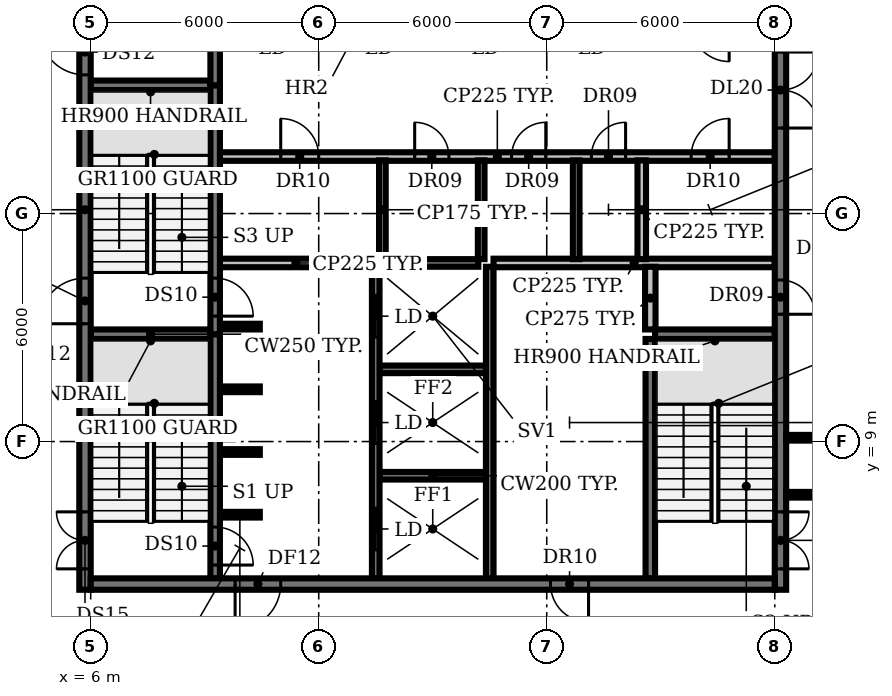
"""IFC4 building model, lengths in metres.
Left out: names, types, materials, properties, quantities, classifications, styles, units other than length and angle.
Written with IfcOpenShell. Run it as: python <this file> out.ifc"""

import sys

from ifc_helpers import new_model, si_unit, direction, frame, frame_2d, origin, place, context, subcontext, project, spatial, rectangle, extrude, element, fill, save


model = new_model("IFC4")
c1 = context("Model", 3, precision=1e-05, world=origin(), true_north=direction((0.0, 1.0)))
c2 = subcontext(c1, "Body", "Model", "MODEL_VIEW")
j1 = project(units=[si_unit("LENGTHUNIT", "METRE"), si_unit("PLANEANGLEUNIT", "RADIAN")], contexts=[c1])
p1 = place(None, origin())
s1 = spatial("IfcSite", under=j1, at=p1, CompositionType="ELEMENT")
p2 = place(p1, origin())
s2 = spatial("IfcBuilding", under=s1, at=p2, CompositionType="ELEMENT")
p3 = place(p2, frame((0.0, 0.0, 314.6)))
s3 = spatial("IfcBuildingStorey", under=s2, at=p3, CompositionType="ELEMENT", Elevation=314.6)
p4 = place(p3, frame((9.4, 7.075, 0.0), z_axis=(0.0, 0.0, 1.0), x_axis=(1.0, 0.0, 0.0)))
e1 = element("IfcWall", 1, at=p4, inside=s3, PredefinedType="SHEAR", context=c2, shape_type="SweptSolid", body=[
    extrude(rectangle(XDim=1.05, YDim=0.15, at=frame_2d((0.525, 0.0))), origin(), (0.0, 0.0, 1.0), 3.9),
])
p5 = place(p3, frame((13.6, 8.1, 0.0), z_axis=(0.0, 0.0, 1.0), x_axis=(1.0, 0.0, 0.0)))
e2 = element("IfcWall", 2, at=p5, inside=s3, PredefinedType="SHEAR", context=c2, shape_type="SweptSolid", body=[
    extrude(rectangle(XDim=2.8, YDim=0.2, at=frame_2d((1.4, 0.0))), origin(), (0.0, 0.0, 1.0), 3.9),
])
for number, where, z_axis, x_axis in (
    (3, (9.4, 8.725, 0.0), (0.0, 0.0, 1.0), (1.0, 0.0, 0.0)),
    (4, (9.4, 10.375, 0.0), (0.0, 0.0, 1.0), (1.0, 0.0, 0.0)),
):
    element("IfcWall", number, at=place(p3, frame(where, z_axis=z_axis, x_axis=x_axis)), inside=s3, PredefinedType="SHEAR", context=c2, shape_type="SweptSolid", body=[
        extrude(rectangle(XDim=1.05, YDim=0.15, at=frame_2d((0.525, 0.0))), origin(), (0.0, 0.0, 1.0), 3.9),
    ])
p6 = place(p3, frame((13.6, 10.9, 0.0), z_axis=(0.0, 0.0, 1.0), x_axis=(1.0, 0.0, 0.0)))
e5 = element("IfcWall", 5, at=p6, inside=s3, PredefinedType="SHEAR", context=c2, shape_type="SweptSolid", body=[
    extrude(rectangle(XDim=2.8, YDim=0.2, at=frame_2d((1.4, 0.0))), origin(), (0.0, 0.0, 1.0), 3.9),
])
for number, where, z_axis, x_axis in (
    (6, (6.0, 11.825, 0.0), (0.0, 0.0, 1.0), (1.0, 0.0, 0.0)),
    (7, (20.85, 11.825, 0.0), (0.0, 0.0, 1.0), (1.0, 0.0, 0.0)),
):
    element("IfcWall", number, at=place(p3, frame(where, z_axis=z_axis, x_axis=x_axis)), inside=s3, PredefinedType="SHEAR", context=c2, shape_type="SweptSolid", body=[
        extrude(rectangle(XDim=3.15, YDim=0.25, at=frame_2d((1.575, 0.0))), origin(), (0.0, 0.0, 1.0), 3.9),
    ])
p7 = place(p3, frame((9.4, 12.025, 0.0), z_axis=(0.0, 0.0, 1.0), x_axis=(1.0, 0.0, 0.0)))
e8 = element("IfcWall", 8, at=p7, inside=s3, PredefinedType="SHEAR", context=c2, shape_type="SweptSolid", body=[
    extrude(rectangle(XDim=1.05, YDim=0.15, at=frame_2d((0.525, 0.0))), origin(), (0.0, 0.0, 1.0), 3.9),
])
p8 = place(p3, frame((9.4, 13.7, 0.0), z_axis=(0.0, 0.0, 1.0), x_axis=(1.0, 0.0, 0.0)))
e9 = element("IfcWall", 9, at=p8, inside=s3, PredefinedType="PARTITIONING", context=c2, shape_type="SweptSolid", body=[
    extrude(rectangle(XDim=4.0, YDim=0.225, at=frame_2d((2.0, 0.0))), origin(), (0.0, 0.0, 1.0), 3.9),
])
p9 = place(p3, frame((13.75, 13.7, 0.0), z_axis=(0.0, 0.0, 1.0), x_axis=(1.0, 0.0, 0.0)))
e10 = element("IfcWall", 10, at=p9, inside=s3, PredefinedType="SHEAR", context=c2, shape_type="SweptSolid", body=[
    extrude(rectangle(XDim=2.45, YDim=0.2, at=frame_2d((1.225, 0.0))), origin(), (0.0, 0.0, 1.0), 3.9),
])
p10 = place(p3, frame((16.6, 13.7, 0.0), z_axis=(0.0, 0.0, 1.0), x_axis=(1.0, 0.0, 0.0)))
e11 = element("IfcWall", 11, at=p10, inside=s3, PredefinedType="PARTITIONING", context=c2, shape_type="SweptSolid", body=[
    extrude(rectangle(XDim=7.4, YDim=0.225, at=frame_2d((3.7, 0.0))), origin(), (0.0, 0.0, 1.0), 3.9),
])
p11 = place(p3, frame((9.4, 16.5, 0.0), z_axis=(0.0, 0.0, 1.0), x_axis=(1.0, 0.0, 0.0)))
e12 = element("IfcWall", 12, at=p11, inside=s3, PredefinedType="PARTITIONING", context=c2, shape_type="SweptSolid", body=[
    extrude(rectangle(XDim=14.6, YDim=0.225, at=frame_2d((7.3, 0.0))), origin(), (0.0, 0.0, 1.0), 3.9),
])
p12 = place(p11, frame((1.6, 0.0, 0.0)))
e13 = element("IfcOpeningElement", 13, at=p12, cuts=e12, PredefinedType="OPENING", context=c2, shape_type="SweptSolid", body=[
    extrude(rectangle(XDim=1.0, YDim=2.1, at=frame_2d((0.5, 1.05))), frame((0.0, 0.123, 0.0), z_axis=(0.0, -1.0, 0.0), x_axis=(1.0, 0.0, 0.0)), (0.0, 0.0, 1.0), 0.245),
])
p13 = place(p11, frame((5.125, 0.0, 0.0)))
e14 = element("IfcOpeningElement", 14, at=p13, cuts=e12, PredefinedType="OPENING", context=c2, shape_type="SweptSolid", body=[
    extrude(rectangle(XDim=0.9, YDim=2.1, at=frame_2d((0.45, 1.05))), frame((0.0, 0.123, 0.0), z_axis=(0.0, -1.0, 0.0), x_axis=(1.0, 0.0, 0.0)), (0.0, 0.0, 1.0), 0.245),
])
p14 = place(p11, frame((7.675, 0.0, 0.0)))
e15 = element("IfcOpeningElement", 15, at=p14, cuts=e12, PredefinedType="OPENING", context=c2, shape_type="SweptSolid", body=[
    extrude(rectangle(XDim=0.9, YDim=2.1, at=frame_2d((0.45, 1.05))), frame((0.0, 0.123, 0.0), z_axis=(0.0, -1.0, 0.0), x_axis=(1.0, 0.0, 0.0)), (0.0, 0.0, 1.0), 0.245),
])
p15 = place(p11, frame((9.775, 0.0, 0.0)))
e16 = element("IfcOpeningElement", 16, at=p15, cuts=e12, PredefinedType="OPENING", context=c2, shape_type="SweptSolid", body=[
    extrude(rectangle(XDim=0.9, YDim=2.1, at=frame_2d((0.45, 1.05))), frame((0.0, 0.123, 0.0), z_axis=(0.0, -1.0, 0.0), x_axis=(1.0, 0.0, 0.0)), (0.0, 0.0, 1.0), 0.245),
])
p16 = place(p11, frame((12.4, 0.0, 0.0)))
e17 = element("IfcOpeningElement", 17, at=p16, cuts=e12, PredefinedType="OPENING", context=c2, shape_type="SweptSolid", body=[
    extrude(rectangle(XDim=1.0, YDim=2.1, at=frame_2d((0.5, 1.05))), frame((0.0, 0.123, 0.0), z_axis=(0.0, -1.0, 0.0), x_axis=(1.0, 0.0, 0.0)), (0.0, 0.0, 1.0), 0.245),
])
p17 = place(p3, frame((6.0, 18.375, 0.0), z_axis=(0.0, 0.0, 1.0), x_axis=(1.0, 0.0, 0.0)))
e18 = element("IfcWall", 18, at=p17, inside=s3, PredefinedType="SHEAR", context=c2, shape_type="SweptSolid", body=[
    extrude(rectangle(XDim=3.15, YDim=0.25, at=frame_2d((1.575, 0.0))), origin(), (0.0, 0.0, 1.0), 3.9),
])
p18 = place(p3, frame((9.275, 11.825, 0.0), z_axis=(0.0, 0.0, 1.0), x_axis=(0.0, -1.0, 0.0)))
e19 = element("IfcWall", 19, at=p18, inside=s3, PredefinedType="SHEAR", context=c2, shape_type="SweptSolid", body=[
    extrude(rectangle(XDim=6.425, YDim=0.25, at=frame_2d((3.212, 0.0))), origin(), (0.0, 0.0, 1.0), 3.9),
])
p19 = place(p18, frame((5.075, 0.0, 0.0)))
e20 = element("IfcOpeningElement", 20, at=p19, cuts=e19, PredefinedType="OPENING", context=c2, shape_type="SweptSolid", body=[
    extrude(rectangle(XDim=1.0, YDim=2.1, at=frame_2d((0.5, 1.05))), frame((0.0, 0.135, 0.0), z_axis=(0.0, -1.0, 0.0), x_axis=(1.0, 0.0, 0.0)), (0.0, 0.0, 1.0), 0.27),
])
p20 = place(p3, frame((9.275, 18.375, 0.0), z_axis=(0.0, 0.0, 1.0), x_axis=(0.0, -1.0, 0.0)))
e21 = element("IfcWall", 21, at=p20, inside=s3, PredefinedType="SHEAR", context=c2, shape_type="SweptSolid", body=[
    extrude(rectangle(XDim=6.55, YDim=0.25, at=frame_2d((3.275, 0.0))), origin(), (0.0, 0.0, 1.0), 3.9),
])
p21 = place(p20, frame((5.075, 0.0, 0.0)))
e22 = element("IfcOpeningElement", 22, at=p21, cuts=e21, PredefinedType="OPENING", context=c2, shape_type="SweptSolid", body=[
    extrude(rectangle(XDim=1.0, YDim=2.1, at=frame_2d((0.5, 1.05))), frame((0.0, 0.135, 0.0), z_axis=(0.0, -1.0, 0.0), x_axis=(1.0, 0.0, 0.0)), (0.0, 0.0, 1.0), 0.27),
])
p22 = place(p3, frame((9.275, 18.375, 0.0), z_axis=(0.0, 0.0, 1.0), x_axis=(0.0, 1.0, 0.0)))
e23 = element("IfcWall", 23, at=p22, inside=s3, PredefinedType="SHEAR", context=c2, shape_type="SweptSolid", body=[
    extrude(rectangle(XDim=6.425, YDim=0.25, at=frame_2d((3.212, 0.0))), origin(), (0.0, 0.0, 1.0), 3.9),
])
p23 = place(p3, frame((13.5, 5.4, 0.0), z_axis=(0.0, 0.0, 1.0), x_axis=(0.0, 1.0, 0.0)))
e24 = element("IfcWall", 24, at=p23, inside=s3, PredefinedType="SHEAR", context=c2, shape_type="SweptSolid", body=[
    extrude(rectangle(XDim=8.2, YDim=0.2, at=frame_2d((4.1, 0.0))), origin(), (0.0, 0.0, 1.0), 3.9),
])
p24 = place(p23, frame((0.75, 0.0, 0.0)))
e25 = element("IfcOpeningElement", 25, at=p24, cuts=e24, PredefinedType="OPENING", context=c2, shape_type="SweptSolid", body=[
    extrude(rectangle(XDim=1.1, YDim=2.1, at=frame_2d((0.55, 1.05))), frame((0.0, 0.11, 0.0), z_axis=(0.0, -1.0, 0.0), x_axis=(1.0, 0.0, 0.0)), (0.0, 0.0, 1.0), 0.22),
])
p25 = place(p23, frame((3.55, 0.0, 0.0)))
e26 = element("IfcOpeningElement", 26, at=p25, cuts=e24, PredefinedType="OPENING", context=c2, shape_type="SweptSolid", body=[
    extrude(rectangle(XDim=1.1, YDim=2.1, at=frame_2d((0.55, 1.05))), frame((0.0, 0.11, 0.0), z_axis=(0.0, -1.0, 0.0), x_axis=(1.0, 0.0, 0.0)), (0.0, 0.0, 1.0), 0.22),
])
p26 = place(p23, frame((6.35, 0.0, 0.0)))
e27 = element("IfcOpeningElement", 27, at=p26, cuts=e24, PredefinedType="OPENING", context=c2, shape_type="SweptSolid", body=[
    extrude(rectangle(XDim=1.1, YDim=2.1, at=frame_2d((0.55, 1.05))), frame((0.0, 0.11, 0.0), z_axis=(0.0, -1.0, 0.0), x_axis=(1.0, 0.0, 0.0)), (0.0, 0.0, 1.0), 0.22),
])
for number, where, z_axis, x_axis in (
    (28, (13.675, 13.8, 0.0), (0.0, 0.0, 1.0), (0.0, 1.0, 0.0)),
    (29, (16.275, 13.8, 0.0), (0.0, 0.0, 1.0), (0.0, 1.0, 0.0)),
):
    element("IfcWall", number, at=place(p3, frame(where, z_axis=z_axis, x_axis=x_axis)), inside=s3, PredefinedType="PARTITIONING", context=c2, shape_type="SweptSolid", body=[
        extrude(rectangle(XDim=2.6, YDim=0.175, at=frame_2d((1.3, 0.0))), origin(), (0.0, 0.0, 1.0), 3.9),
    ])
p27 = place(p3, frame((16.5, 5.4, 0.0), z_axis=(0.0, 0.0, 1.0), x_axis=(0.0, 1.0, 0.0)))
e30 = element("IfcWall", 30, at=p27, inside=s3, PredefinedType="SHEAR", context=c2, shape_type="SweptSolid", body=[
    extrude(rectangle(XDim=8.2, YDim=0.2, at=frame_2d((4.1, 0.0))), origin(), (0.0, 0.0, 1.0), 3.9),
])
p28 = place(p3, frame((18.775, 13.8, 0.0), z_axis=(0.0, 0.0, 1.0), x_axis=(0.0, 1.0, 0.0)))
e31 = element("IfcWall", 31, at=p28, inside=s3, PredefinedType="PARTITIONING", context=c2, shape_type="SweptSolid", body=[
    extrude(rectangle(XDim=2.6, YDim=0.175, at=frame_2d((1.3, 0.0))), origin(), (0.0, 0.0, 1.0), 3.9),
])
p29 = place(p3, frame((20.5, 13.8, 0.0), z_axis=(0.0, 0.0, 1.0), x_axis=(0.0, 1.0, 0.0)))
e32 = element("IfcWall", 32, at=p29, inside=s3, PredefinedType="PARTITIONING", context=c2, shape_type="SweptSolid", body=[
    extrude(rectangle(XDim=2.6, YDim=0.225, at=frame_2d((1.3, 0.0))), origin(), (0.0, 0.0, 1.0), 3.9),
])
p30 = place(p3, frame((20.725, 5.4, 0.0), z_axis=(0.0, 0.0, 1.0), x_axis=(0.0, 1.0, 0.0)))
e33 = element("IfcWall", 33, at=p30, inside=s3, PredefinedType="SHEAR", context=c2, shape_type="SweptSolid", body=[
    extrude(rectangle(XDim=6.3, YDim=0.25, at=frame_2d((3.15, 0.0))), origin(), (0.0, 0.0, 1.0), 3.9),
])
p31 = place(p3, frame((20.725, 11.95, 0.0), z_axis=(0.0, 0.0, 1.0), x_axis=(0.0, 1.0, 0.0)))
e34 = element("IfcWall", 34, at=p31, inside=s3, PredefinedType="PARTITIONING", context=c2, shape_type="SweptSolid", body=[
    extrude(rectangle(XDim=1.65, YDim=0.275, at=frame_2d((0.825, 0.0))), origin(), (0.0, 0.0, 1.0), 3.9),
])
p32 = place(p3, frame((5.85, 5.1, 0.0), z_axis=(0.0, 0.0, 1.0), x_axis=(0.0, 1.0, 0.0)))
e35 = element("IfcWall", 35, at=p32, inside=s3, PredefinedType="SHEAR", context=c2, shape_type="SweptSolid", body=[
    extrude(rectangle(XDim=20.0, YDim=0.3, at=frame_2d((10.0, 0.0))), origin(), (0.0, 0.0, 1.0), 3.9),
])
p33 = place(p32, frame((0.55, 0.0, 0.0)))
e36 = element("IfcOpeningElement", 36, at=p33, cuts=e35, PredefinedType="OPENING", context=c2, shape_type="SweptSolid", body=[
    extrude(rectangle(XDim=1.5, YDim=2.1, at=frame_2d((0.75, 1.05))), frame((0.0, 0.16, 0.0), z_axis=(0.0, -1.0, 0.0), x_axis=(1.0, 0.0, 0.0)), (0.0, 0.0, 1.0), 0.32),
])
p34 = place(p32, frame((7.0, 0.0, 0.0)))
e37 = element("IfcOpeningElement", 37, at=p34, cuts=e35, PredefinedType="OPENING", context=c2, shape_type="SweptSolid", body=[
    extrude(rectangle(XDim=1.2, YDim=2.1, at=frame_2d((0.6, 1.05))), frame((0.0, 0.16, 0.0), z_axis=(0.0, -1.0, 0.0), x_axis=(1.0, 0.0, 0.0)), (0.0, 0.0, 1.0), 0.32),
])
p35 = place(p32, frame((13.55, 0.0, 0.0)))
e38 = element("IfcOpeningElement", 38, at=p35, cuts=e35, PredefinedType="OPENING", context=c2, shape_type="SweptSolid", body=[
    extrude(rectangle(XDim=1.2, YDim=2.1, at=frame_2d((0.6, 1.05))), frame((0.0, 0.16, 0.0), z_axis=(0.0, -1.0, 0.0), x_axis=(1.0, 0.0, 0.0)), (0.0, 0.0, 1.0), 0.32),
])
p36 = place(p3, frame((24.15, 25.705, 0.0), z_axis=(0.0, 0.0, 1.0), x_axis=(0.0, -1.0, 0.0)))
e39 = element("IfcWall", 39, at=p36, inside=s3, PredefinedType="SHEAR", context=c2, shape_type="SweptSolid", body=[
    extrude(rectangle(XDim=20.605, YDim=0.3, at=frame_2d((10.302, 0.0))), origin(), (0.0, 0.0, 1.0), 3.9),
])
p37 = place(p36, frame((18.555, 0.0, 0.0)))
e40 = element("IfcOpeningElement", 40, at=p37, cuts=e39, PredefinedType="OPENING", context=c2, shape_type="SweptSolid", body=[
    extrude(rectangle(XDim=1.5, YDim=2.1, at=frame_2d((0.75, 1.05))), frame((0.0, 0.16, 0.0), z_axis=(0.0, -1.0, 0.0), x_axis=(1.0, 0.0, 0.0)), (0.0, 0.0, 1.0), 0.32),
])
p38 = place(p36, frame((12.455, 0.0, 0.0)))
e41 = element("IfcOpeningElement", 41, at=p38, cuts=e39, PredefinedType="OPENING", context=c2, shape_type="SweptSolid", body=[
    extrude(rectangle(XDim=0.9, YDim=2.1, at=frame_2d((0.45, 1.05))), frame((0.0, 0.16, 0.0), z_axis=(0.0, -1.0, 0.0), x_axis=(1.0, 0.0, 0.0)), (0.0, 0.0, 1.0), 0.32),
])
p39 = place(p36, frame((6.455, 0.0, 0.0)))
e42 = element("IfcOpeningElement", 42, at=p39, cuts=e39, PredefinedType="OPENING", context=c2, shape_type="SweptSolid", body=[
    extrude(rectangle(XDim=2.0, YDim=2.1, at=frame_2d((1.0, 1.05))), frame((0.0, 0.16, 0.0), z_axis=(0.0, -1.0, 0.0), x_axis=(1.0, 0.0, 0.0)), (0.0, 0.0, 1.0), 0.32),
])
p40 = place(p3, frame((24.0, 5.25, 0.0), z_axis=(0.0, 0.0, 1.0), x_axis=(-1.0, 0.0, 0.0)))
e43 = element("IfcWall", 43, at=p40, inside=s3, PredefinedType="SHEAR", context=c2, shape_type="SweptSolid", body=[
    extrude(rectangle(XDim=18.0, YDim=0.3, at=frame_2d((9.0, 0.0))), origin(), (0.0, 0.0, 1.0), 3.9),
])
p41 = place(p40, frame((13.0, 0.0, 0.0)))
e44 = element("IfcOpeningElement", 44, at=p41, cuts=e43, PredefinedType="OPENING", context=c2, shape_type="SweptSolid", body=[
    extrude(rectangle(XDim=1.2, YDim=2.1, at=frame_2d((0.6, 1.05))), frame((0.0, 0.16, 0.0), z_axis=(0.0, -1.0, 0.0), x_axis=(1.0, 0.0, 0.0)), (0.0, 0.0, 1.0), 0.32),
])
p42 = place(p40, frame((4.9, 0.0, 0.0)))
e45 = element("IfcOpeningElement", 45, at=p42, cuts=e43, PredefinedType="OPENING", context=c2, shape_type="SweptSolid", body=[
    extrude(rectangle(XDim=1.0, YDim=2.1, at=frame_2d((0.5, 1.05))), frame((0.0, 0.16, 0.0), z_axis=(0.0, -1.0, 0.0), x_axis=(1.0, 0.0, 0.0)), (0.0, 0.0, 1.0), 0.32),
])
for number, where, z_axis, x_axis in (
    (46, (24.3, 7.6, 0.0), (0.0, 0.0, 1.0), (1.0, 0.0, 0.0)),
    (47, (24.3, 9.1, 0.0), (0.0, 0.0, 1.0), (1.0, 0.0, 0.0)),
):
    element("IfcWall", number, at=place(p3, frame(where, z_axis=z_axis, x_axis=x_axis)), inside=s3, PredefinedType="PARTITIONING", context=c2, shape_type="SweptSolid", body=[
        extrude(rectangle(XDim=1.05, YDim=0.15, at=frame_2d((0.525, 0.0))), origin(), (0.0, 0.0, 1.0), 2.95),
    ])
p43 = place(p12, origin())
e48 = element("IfcDoor", 48, at=p43, inside=s3, OperationType="SINGLE_SWING_LEFT", PredefinedType="DOOR", context=c2, shape_type="SweptSolid", body=[
    extrude(rectangle(XDim=1.0, YDim=2.1, at=frame_2d((0.5, 1.05))), frame((0.0, 0.025, 0.0), z_axis=(0.0, -1.0, 0.0), x_axis=(1.0, 0.0, 0.0)), (0.0, 0.0, 1.0), 0.05),
])
fill(e13, e48)
p44 = place(p13, origin())
e49 = element("IfcDoor", 49, at=p44, inside=s3, OperationType="SINGLE_SWING_LEFT", PredefinedType="DOOR", context=c2, shape_type="SweptSolid", body=[
    extrude(rectangle(XDim=0.9, YDim=2.1, at=frame_2d((0.45, 1.05))), frame((0.0, 0.025, 0.0), z_axis=(0.0, -1.0, 0.0), x_axis=(1.0, 0.0, 0.0)), (0.0, 0.0, 1.0), 0.05),
])
fill(e14, e49)
p45 = place(p14, origin())
e50 = element("IfcDoor", 50, at=p45, inside=s3, OperationType="SINGLE_SWING_RIGHT", PredefinedType="DOOR", context=c2, shape_type="SweptSolid", body=[
    extrude(rectangle(XDim=0.9, YDim=2.1, at=frame_2d((0.45, 1.05))), frame((0.0, 0.025, 0.0), z_axis=(0.0, -1.0, 0.0), x_axis=(1.0, 0.0, 0.0)), (0.0, 0.0, 1.0), 0.05),
])
fill(e15, e50)
p46 = place(p15, origin())
e51 = element("IfcDoor", 51, at=p46, inside=s3, OperationType="SINGLE_SWING_RIGHT", PredefinedType="DOOR", context=c2, shape_type="SweptSolid", body=[
    extrude(rectangle(XDim=0.9, YDim=2.1, at=frame_2d((0.45, 1.05))), frame((0.0, 0.025, 0.0), z_axis=(0.0, -1.0, 0.0), x_axis=(1.0, 0.0, 0.0)), (0.0, 0.0, 1.0), 0.05),
])
fill(e16, e51)
p47 = place(p16, origin())
e52 = element("IfcDoor", 52, at=p47, inside=s3, OperationType="SINGLE_SWING_RIGHT", PredefinedType="DOOR", context=c2, shape_type="SweptSolid", body=[
    extrude(rectangle(XDim=1.0, YDim=2.1, at=frame_2d((0.5, 1.05))), frame((0.0, 0.025, 0.0), z_axis=(0.0, -1.0, 0.0), x_axis=(1.0, 0.0, 0.0)), (0.0, 0.0, 1.0), 0.05),
])
fill(e17, e52)
p48 = place(p19, origin())
e53 = element("IfcDoor", 53, at=p48, inside=s3, OperationType="SINGLE_SWING_RIGHT", PredefinedType="DOOR", context=c2, shape_type="SweptSolid", body=[
    extrude(rectangle(XDim=1.0, YDim=2.1, at=frame_2d((0.5, 1.05))), frame((0.0, 0.025, 0.0), z_axis=(0.0, -1.0, 0.0), x_axis=(1.0, 0.0, 0.0)), (0.0, 0.0, 1.0), 0.05),
])
fill(e20, e53)
p49 = place(p21, origin())
e54 = element("IfcDoor", 54, at=p49, inside=s3, OperationType="SINGLE_SWING_RIGHT", PredefinedType="DOOR", context=c2, shape_type="SweptSolid", body=[
    extrude(rectangle(XDim=1.0, YDim=2.1, at=frame_2d((0.5, 1.05))), frame((0.0, 0.025, 0.0), z_axis=(0.0, -1.0, 0.0), x_axis=(1.0, 0.0, 0.0)), (0.0, 0.0, 1.0), 0.05),
])
fill(e22, e54)
p50 = place(p24, origin())
e55 = element("IfcDoor", 55, at=p50, inside=s3, OperationType="DOUBLE_DOOR_SLIDING", PredefinedType="DOOR", context=c2, shape_type="SweptSolid", body=[
    extrude(rectangle(XDim=1.1, YDim=2.1, at=frame_2d((0.55, 1.05))), frame((0.0, 0.025, 0.0), z_axis=(0.0, -1.0, 0.0), x_axis=(1.0, 0.0, 0.0)), (0.0, 0.0, 1.0), 0.05),
])
fill(e25, e55)
p51 = place(p25, origin())
e56 = element("IfcDoor", 56, at=p51, inside=s3, OperationType="DOUBLE_DOOR_SLIDING", PredefinedType="DOOR", context=c2, shape_type="SweptSolid", body=[
    extrude(rectangle(XDim=1.1, YDim=2.1, at=frame_2d((0.55, 1.05))), frame((0.0, 0.025, 0.0), z_axis=(0.0, -1.0, 0.0), x_axis=(1.0, 0.0, 0.0)), (0.0, 0.0, 1.0), 0.05),
])
fill(e26, e56)
p52 = place(p26, origin())
e57 = element("IfcDoor", 57, at=p52, inside=s3, OperationType="DOUBLE_DOOR_SLIDING", PredefinedType="DOOR", context=c2, shape_type="SweptSolid", body=[
    extrude(rectangle(XDim=1.1, YDim=2.1, at=frame_2d((0.55, 1.05))), frame((0.0, 0.025, 0.0), z_axis=(0.0, -1.0, 0.0), x_axis=(1.0, 0.0, 0.0)), (0.0, 0.0, 1.0), 0.05),
])
fill(e27, e57)
p53 = place(p33, origin())
e58 = element("IfcDoor", 58, at=p53, inside=s3, OperationType="DOUBLE_DOOR_SINGLE_SWING", PredefinedType="DOOR", context=c2, shape_type="SweptSolid", body=[
    extrude(rectangle(XDim=1.5, YDim=2.1, at=frame_2d((0.75, 1.05))), frame((0.0, 0.025, 0.0), z_axis=(0.0, -1.0, 0.0), x_axis=(1.0, 0.0, 0.0)), (0.0, 0.0, 1.0), 0.05),
])
fill(e36, e58)
p54 = place(p34, origin())
e59 = element("IfcDoor", 59, at=p54, inside=s3, OperationType="SINGLE_SWING_LEFT", PredefinedType="DOOR", context=c2, shape_type="SweptSolid", body=[
    extrude(rectangle(XDim=1.2, YDim=2.1, at=frame_2d((0.6, 1.05))), frame((0.0, 0.025, 0.0), z_axis=(0.0, -1.0, 0.0), x_axis=(1.0, 0.0, 0.0)), (0.0, 0.0, 1.0), 0.05),
])
fill(e37, e59)
p55 = place(p35, origin())
e60 = element("IfcDoor", 60, at=p55, inside=s3, OperationType="SINGLE_SWING_RIGHT", PredefinedType="DOOR", context=c2, shape_type="SweptSolid", body=[
    extrude(rectangle(XDim=1.2, YDim=2.1, at=frame_2d((0.6, 1.05))), frame((0.0, 0.025, 0.0), z_axis=(0.0, -1.0, 0.0), x_axis=(1.0, 0.0, 0.0)), (0.0, 0.0, 1.0), 0.05),
])
fill(e38, e60)
p56 = place(p37, origin())
e61 = element("IfcDoor", 61, at=p56, inside=s3, OperationType="DOUBLE_DOOR_SINGLE_SWING", PredefinedType="DOOR", context=c2, shape_type="SweptSolid", body=[
    extrude(rectangle(XDim=1.5, YDim=2.1, at=frame_2d((0.75, 1.05))), frame((0.0, 0.025, 0.0), z_axis=(0.0, -1.0, 0.0), x_axis=(1.0, 0.0, 0.0)), (0.0, 0.0, 1.0), 0.05),
])
fill(e40, e61)
p57 = place(p38, origin())
e62 = element("IfcDoor", 62, at=p57, inside=s3, OperationType="SINGLE_SWING_RIGHT", PredefinedType="DOOR", context=c2, shape_type="SweptSolid", body=[
    extrude(rectangle(XDim=0.9, YDim=2.1, at=frame_2d((0.45, 1.05))), frame((0.0, 0.025, 0.0), z_axis=(0.0, -1.0, 0.0), x_axis=(1.0, 0.0, 0.0)), (0.0, 0.0, 1.0), 0.05),
])
fill(e41, e62)
p58 = place(p39, origin())
e63 = element("IfcDoor", 63, at=p58, inside=s3, OperationType="DOUBLE_DOOR_SINGLE_SWING", PredefinedType="DOOR", context=c2, shape_type="SweptSolid", body=[
    extrude(rectangle(XDim=2.0, YDim=2.1, at=frame_2d((1.0, 1.05))), frame((0.0, 0.025, 0.0), z_axis=(0.0, -1.0, 0.0), x_axis=(1.0, 0.0, 0.0)), (0.0, 0.0, 1.0), 0.05),
])
fill(e42, e63)
p59 = place(p41, origin())
e64 = element("IfcDoor", 64, at=p59, inside=s3, OperationType="SINGLE_SWING_RIGHT", PredefinedType="DOOR", context=c2, shape_type="SweptSolid", body=[
    extrude(rectangle(XDim=1.2, YDim=2.1, at=frame_2d((0.6, 1.05))), frame((0.0, 0.025, 0.0), z_axis=(0.0, -1.0, 0.0), x_axis=(1.0, 0.0, 0.0)), (0.0, 0.0, 1.0), 0.05),
])
fill(e44, e64)
p60 = place(p42, origin())
e65 = element("IfcDoor", 65, at=p60, inside=s3, OperationType="SINGLE_SWING_LEFT", PredefinedType="DOOR", context=c2, shape_type="SweptSolid", body=[
    extrude(rectangle(XDim=1.0, YDim=2.1, at=frame_2d((0.5, 1.05))), frame((0.0, 0.025, 0.0), z_axis=(0.0, -1.0, 0.0), x_axis=(1.0, 0.0, 0.0)), (0.0, 0.0, 1.0), 0.05),
])
fill(e45, e65)
save(model, sys.argv[1])
